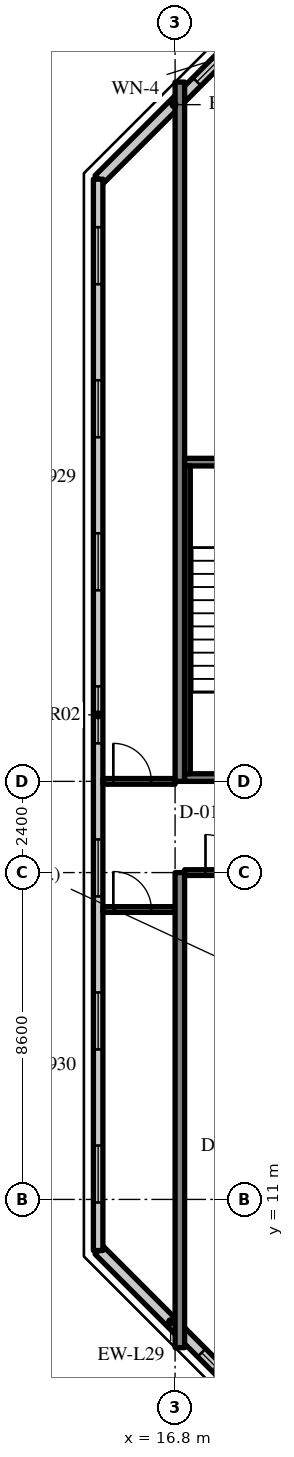
"""IFC4 building model, lengths in metres.
Left out: names, types, materials, properties, quantities, classifications, styles, units other than length and angle.
Written with IfcOpenShell. Run it as: python <this file> out.ifc"""

import sys

from ifc_helpers import new_model, si_unit, direction, frame, frame_2d, origin, place, context, subcontext, project, spatial, rectangle, extrude, source, transform, mapped, element, fill, save


model = new_model("IFC4")
c1 = context("Model", 3, precision=1e-05, world=origin(), true_north=direction((0.0, 1.0)))
c2 = subcontext(c1, "Body", "Model", "MODEL_VIEW")
j1 = project(units=[si_unit("LENGTHUNIT", "METRE"), si_unit("PLANEANGLEUNIT", "RADIAN")], contexts=[c1])
p1 = place(None, origin())
s1 = spatial("IfcSite", under=j1, at=p1, CompositionType="ELEMENT")
p2 = place(p1, origin())
s2 = spatial("IfcBuilding", under=s1, at=p2, CompositionType="ELEMENT")
p3 = place(p2, frame((0.0, 0.0, 289.7)))
s3 = spatial("IfcBuildingStorey", under=s2, at=p3, CompositionType="ELEMENT", Elevation=289.7)
m1 = source(origin(), c2, "Body", "SweptSolid", [
    extrude(rectangle(XDim=12.5, YDim=0.25, at=frame_2d((6.25, 0.0))), origin(), (0.0, 0.0, 1.0), 3.72),
])
p4 = place(p3, frame((16.925, 7.1, 0.0), z_axis=(0.0, 0.0, 1.0), x_axis=(0.0, 1.0, 0.0)))
e1 = element("IfcWall", 1, at=p4, inside=s3, PredefinedType="SHEAR", context=c2, shape_type="MappedRepresentation", body=[
    mapped(m1, transform((0.0, 0.0, 0.0), scale=1.0)),
])
m2 = source(origin(), c2, "Body", "SweptSolid", [
    extrude(rectangle(XDim=18.4, YDim=0.25, at=frame_2d((9.2, 0.0))), origin(), (0.0, 0.0, 1.0), 3.72),
])
p5 = place(p3, frame((16.925, 22.0, 0.0), z_axis=(0.0, 0.0, 1.0), x_axis=(0.0, 1.0, 0.0)))
e2 = element("IfcWall", 2, at=p5, inside=s3, PredefinedType="SHEAR", context=c2, shape_type="MappedRepresentation", body=[
    mapped(m2, transform((0.0, 0.0, 0.0), scale=1.0)),
])
m3 = source(origin(), c2, "Body", "SweptSolid", [
    extrude(rectangle(XDim=5.576, YDim=0.3, at=frame_2d((2.788, 0.0))), origin(), (0.0, 0.0, 1.0), 3.72),
])
p6 = place(p3, frame((18.743, 41.777, 0.0), z_axis=(0.0, 0.0, 1.0), x_axis=(-0.707106781187, -0.707106781187, 0.0)))
e3 = element("IfcWall", 3, at=p6, inside=s3, PredefinedType="SOLIDWALL", context=c2, shape_type="MappedRepresentation", body=[
    mapped(m3, transform((0.0, 0.0, 0.0), scale=1.0)),
])
m4 = source(origin(), c2, "Body", "SweptSolid", [
    extrude(rectangle(XDim=1.8, YDim=1.5, at=frame_2d((0.9, 0.75))), frame((0.0, 0.16, 0.0), z_axis=(0.0, -1.0, 0.0), x_axis=(1.0, 0.0, 0.0)), (0.0, 0.0, 1.0), 0.32),
])
p7 = place(p6, frame((0.135, 0.0, 0.9)))
e4 = element("IfcOpeningElement", 4, at=p7, cuts=e3, PredefinedType="OPENING", context=c2, shape_type="MappedRepresentation", body=[
    mapped(m4, transform((0.0, 0.0, 0.0), scale=1.0)),
])
m5 = source(origin(), c2, "Body", "SweptSolid", [
    extrude(rectangle(XDim=5.326, YDim=0.3, at=frame_2d((2.663, 0.0))), origin(), (0.0, 0.0, 1.0), 3.72),
])
p8 = place(p3, frame((14.8, 9.666, 0.0), z_axis=(0.0, 0.0, 1.0), x_axis=(0.707083859269, -0.707129702361, 0.0)))
e5 = element("IfcWall", 5, at=p8, inside=s3, PredefinedType="SOLIDWALL", context=c2, shape_type="MappedRepresentation", body=[
    mapped(m5, transform((0.0, 0.0, 0.0), scale=1.0)),
])
m6 = source(origin(), c2, "Body", "SweptSolid", [
    extrude(rectangle(XDim=1.2, YDim=1.5, at=frame_2d((0.6, 0.75))), frame((0.0, 0.16, 0.0), z_axis=(0.0, -1.0, 0.0), x_axis=(1.0, 0.0, 0.0)), (0.0, 0.0, 1.0), 0.32),
])
p9 = place(p8, frame((3.815, 0.0, 0.9)))
e6 = element("IfcOpeningElement", 6, at=p9, cuts=e5, PredefinedType="OPENING", context=c2, shape_type="MappedRepresentation", body=[
    mapped(m6, transform((0.0, 0.0, 0.0), scale=1.0)),
])
m7 = source(origin(), c2, "Body", "SweptSolid", [
    extrude(rectangle(XDim=28.189, YDim=0.25, at=frame_2d((14.095, 0.0))), origin(), (0.0, 0.0, 1.0), 3.72),
])
p10 = place(p3, frame((14.775, 37.845, 0.0), z_axis=(0.0, 0.0, 1.0), x_axis=(0.0, -1.0, 0.0)))
e7 = element("IfcWall", 7, at=p10, inside=s3, PredefinedType="SOLIDWALL", context=c2, shape_type="MappedRepresentation", body=[
    mapped(m7, transform((0.0, 0.0, 0.0), scale=1.0)),
])
m8 = source(origin(), c2, "Body", "SweptSolid", [
    extrude(rectangle(XDim=1.5, YDim=1.5, at=frame_2d((0.75, 0.75))), frame((0.0, 0.135, 0.0), z_axis=(0.0, -1.0, 0.0), x_axis=(1.0, 0.0, 0.0)), (0.0, 0.0, 1.0), 0.27),
])
p11 = place(p10, frame((1.263, 0.0, 0.9)))
e8 = element("IfcOpeningElement", 8, at=p11, cuts=e7, PredefinedType="OPENING", context=c2, shape_type="MappedRepresentation", body=[
    mapped(m8, transform((0.0, 0.0, 0.0), scale=1.0)),
])
p12 = place(p10, frame((5.291, 0.0, 0.9)))
e9 = element("IfcOpeningElement", 9, at=p12, cuts=e7, PredefinedType="OPENING", context=c2, shape_type="MappedRepresentation", body=[
    mapped(m8, transform((0.0, 0.0, 0.0), scale=1.0)),
])
p13 = place(p10, frame((9.318, 0.0, 0.9)))
e10 = element("IfcOpeningElement", 10, at=p13, cuts=e7, PredefinedType="OPENING", context=c2, shape_type="MappedRepresentation", body=[
    mapped(m8, transform((0.0, 0.0, 0.0), scale=1.0)),
])
p14 = place(p10, frame((13.345, 0.0, 0.9)))
e11 = element("IfcOpeningElement", 11, at=p14, cuts=e7, PredefinedType="OPENING", context=c2, shape_type="MappedRepresentation", body=[
    mapped(m8, transform((0.0, 0.0, 0.0), scale=1.0)),
])
p15 = place(p10, frame((17.372, 0.0, 0.9)))
e12 = element("IfcOpeningElement", 12, at=p15, cuts=e7, PredefinedType="OPENING", context=c2, shape_type="MappedRepresentation", body=[
    mapped(m8, transform((0.0, 0.0, 0.0), scale=1.0)),
])
p16 = place(p10, frame((21.399, 0.0, 0.9)))
e13 = element("IfcOpeningElement", 13, at=p16, cuts=e7, PredefinedType="OPENING", context=c2, shape_type="MappedRepresentation", body=[
    mapped(m8, transform((0.0, 0.0, 0.0), scale=1.0)),
])
p17 = place(p10, frame((25.426, 0.0, 0.9)))
e14 = element("IfcOpeningElement", 14, at=p17, cuts=e7, PredefinedType="OPENING", context=c2, shape_type="MappedRepresentation", body=[
    mapped(m8, transform((0.0, 0.0, 0.0), scale=1.0)),
])
m9 = source(origin(), c2, "Body", "SweptSolid", [
    extrude(rectangle(XDim=8.15, YDim=0.2, at=frame_2d((4.075, 0.0))), origin(), (0.0, 0.0, 1.0), 3.72),
])
p18 = place(p3, frame((17.05, 22.1, 0.0), z_axis=(0.0, 0.0, 1.0), x_axis=(1.0, 0.0, 0.0)))
e15 = element("IfcWall", 15, at=p18, inside=s3, PredefinedType="SOLIDWALL", context=c2, shape_type="MappedRepresentation", body=[
    mapped(m9, transform((0.0, 0.0, 0.0), scale=1.0)),
])
m10 = source(origin(), c2, "Body", "SweptSolid", [
    extrude(rectangle(XDim=1.2, YDim=2.1, at=frame_2d((0.6, 1.05))), frame((0.0, 0.11, 0.0), z_axis=(0.0, -1.0, 0.0), x_axis=(1.0, 0.0, 0.0)), (0.0, 0.0, 1.0), 0.22),
])
p19 = place(p18, frame((5.95, 0.0, 0.0)))
e16 = element("IfcOpeningElement", 16, at=p19, cuts=e15, PredefinedType="OPENING", context=c2, shape_type="MappedRepresentation", body=[
    mapped(m10, transform((0.0, 0.0, 0.0), scale=1.0)),
])
p20 = place(p3, frame((17.05, 30.4, 0.0), z_axis=(0.0, 0.0, 1.0), x_axis=(1.0, 0.0, 0.0)))
e17 = element("IfcWall", 17, at=p20, inside=s3, PredefinedType="SOLIDWALL", context=c2, shape_type="MappedRepresentation", body=[
    mapped(m9, transform((0.0, 0.0, 0.0), scale=1.0)),
])
m11 = source(origin(), c2, "Body", "SweptSolid", [
    extrude(rectangle(XDim=1.0, YDim=2.1, at=frame_2d((0.5, 1.05))), frame((0.0, 0.11, 0.0), z_axis=(0.0, -1.0, 0.0), x_axis=(1.0, 0.0, 0.0)), (0.0, 0.0, 1.0), 0.22),
])
p21 = place(p20, frame((6.05, 0.0, 0.0)))
e18 = element("IfcOpeningElement", 18, at=p21, cuts=e17, PredefinedType="OPENING", context=c2, shape_type="MappedRepresentation", body=[
    mapped(m11, transform((0.0, 0.0, 0.0), scale=1.0)),
])
m12 = source(origin(), c2, "Body", "SweptSolid", [
    extrude(rectangle(XDim=8.1, YDim=0.15, at=frame_2d((4.05, 0.0))), origin(), (0.0, 0.0, 1.0), 3.72),
])
p22 = place(p3, frame((17.125, 22.2, 0.0), z_axis=(0.0, 0.0, 1.0), x_axis=(0.0, 1.0, 0.0)))
e19 = element("IfcWall", 19, at=p22, inside=s3, PredefinedType="SOLIDWALL", context=c2, shape_type="MappedRepresentation", body=[
    mapped(m12, transform((0.0, 0.0, 0.0), scale=1.0)),
])
m13 = source(origin(), c2, "Body", "SweptSolid", [
    extrude(rectangle(XDim=8.025, YDim=0.15, at=frame_2d((4.012, 0.0))), origin(), (0.0, 0.0, 1.0), 3.02),
])
p23 = place(p3, frame((17.05, 19.6, 0.0), z_axis=(0.0, 0.0, 1.0), x_axis=(1.0, 0.0, 0.0)))
e20 = element("IfcWall", 20, at=p23, inside=s3, PredefinedType="PARTITIONING", context=c2, shape_type="MappedRepresentation", body=[
    mapped(m13, transform((0.0, 0.0, 0.0), scale=1.0)),
])
m14 = source(origin(), c2, "Body", "SweptSolid", [
    extrude(rectangle(XDim=1.0, YDim=2.1, at=frame_2d((0.5, 1.05))), frame((0.0, 0.085, 0.0), z_axis=(0.0, -1.0, 0.0), x_axis=(1.0, 0.0, 0.0)), (0.0, 0.0, 1.0), 0.17),
])
p24 = place(p23, frame((0.55, 0.0, 0.0)))
e21 = element("IfcOpeningElement", 21, at=p24, cuts=e20, PredefinedType="OPENING", context=c2, shape_type="MappedRepresentation", body=[
    mapped(m14, transform((0.0, 0.0, 0.0), scale=1.0)),
])
m15 = source(origin(), c2, "Body", "SweptSolid", [
    extrude(rectangle(XDim=1.9, YDim=0.15, at=frame_2d((0.95, 0.0))), origin(), (0.0, 0.0, 1.0), 3.02),
])
p25 = place(p3, frame((14.9, 22.0, 0.0), z_axis=(0.0, 0.0, 1.0), x_axis=(1.0, 0.0, 0.0)))
e22 = element("IfcWall", 22, at=p25, inside=s3, PredefinedType="PARTITIONING", context=c2, shape_type="MappedRepresentation", body=[
    mapped(m15, transform((0.0, 0.0, 0.0), scale=1.0)),
])
p26 = place(p25, frame((0.275, 0.0, 0.0)))
e23 = element("IfcOpeningElement", 23, at=p26, cuts=e22, PredefinedType="OPENING", context=c2, shape_type="MappedRepresentation", body=[
    mapped(m14, transform((0.0, 0.0, 0.0), scale=1.0)),
])
p27 = place(p3, frame((14.9, 18.628, 0.0), z_axis=(0.0, 0.0, 1.0), x_axis=(1.0, 0.0, 0.0)))
e24 = element("IfcWall", 24, at=p27, inside=s3, PredefinedType="PARTITIONING", context=c2, shape_type="MappedRepresentation", body=[
    mapped(m15, transform((0.0, 0.0, 0.0), scale=1.0)),
])
p28 = place(p27, frame((0.275, 0.0, 0.0)))
e25 = element("IfcOpeningElement", 25, at=p28, cuts=e24, PredefinedType="OPENING", context=c2, shape_type="MappedRepresentation", body=[
    mapped(m14, transform((0.0, 0.0, 0.0), scale=1.0)),
])
m16 = source(origin(), c2, "Body", "SweptSolid", [
    extrude(rectangle(XDim=1.8, YDim=1.5, at=frame_2d((0.9, 0.75))), frame((0.0, 0.03, 0.0), z_axis=(0.0, -1.0, 0.0), x_axis=(1.0, 0.0, 0.0)), (0.0, 0.0, 1.0), 0.06),
])
p29 = place(p7, origin())
e26 = element("IfcWindow", 26, at=p29, inside=s3, PartitioningType="SINGLE_PANEL", PredefinedType="WINDOW", context=c2, shape_type="MappedRepresentation", body=[
    mapped(m16, transform((0.0, 0.0, 0.0), scale=1.0)),
])
fill(e4, e26)
m17 = source(origin(), c2, "Body", "SweptSolid", [
    extrude(rectangle(XDim=1.2, YDim=1.5, at=frame_2d((0.6, 0.75))), frame((0.0, 0.03, 0.0), z_axis=(0.0, -1.0, 0.0), x_axis=(1.0, 0.0, 0.0)), (0.0, 0.0, 1.0), 0.06),
])
p30 = place(p9, origin())
e27 = element("IfcWindow", 27, at=p30, inside=s3, PartitioningType="SINGLE_PANEL", PredefinedType="WINDOW", context=c2, shape_type="MappedRepresentation", body=[
    mapped(m17, transform((0.0, 0.0, 0.0), scale=1.0)),
])
fill(e6, e27)
m18 = source(origin(), c2, "Body", "SweptSolid", [
    extrude(rectangle(XDim=1.5, YDim=1.5, at=frame_2d((0.75, 0.75))), frame((0.0, 0.03, 0.0), z_axis=(0.0, -1.0, 0.0), x_axis=(1.0, 0.0, 0.0)), (0.0, 0.0, 1.0), 0.06),
])
p31 = place(p11, origin())
e28 = element("IfcWindow", 28, at=p31, inside=s3, PartitioningType="SINGLE_PANEL", PredefinedType="WINDOW", context=c2, shape_type="MappedRepresentation", body=[
    mapped(m18, transform((0.0, 0.0, 0.0), scale=1.0)),
])
fill(e8, e28)
p32 = place(p12, origin())
e29 = element("IfcWindow", 29, at=p32, inside=s3, PartitioningType="SINGLE_PANEL", PredefinedType="WINDOW", context=c2, shape_type="MappedRepresentation", body=[
    mapped(m18, transform((0.0, 0.0, 0.0), scale=1.0)),
])
fill(e9, e29)
p33 = place(p13, origin())
e30 = element("IfcWindow", 30, at=p33, inside=s3, PartitioningType="SINGLE_PANEL", PredefinedType="WINDOW", context=c2, shape_type="MappedRepresentation", body=[
    mapped(m18, transform((0.0, 0.0, 0.0), scale=1.0)),
])
fill(e10, e30)
p34 = place(p14, origin())
e31 = element("IfcWindow", 31, at=p34, inside=s3, PartitioningType="SINGLE_PANEL", PredefinedType="WINDOW", context=c2, shape_type="MappedRepresentation", body=[
    mapped(m18, transform((0.0, 0.0, 0.0), scale=1.0)),
])
fill(e11, e31)
p35 = place(p15, origin())
e32 = element("IfcWindow", 32, at=p35, inside=s3, PartitioningType="SINGLE_PANEL", PredefinedType="WINDOW", context=c2, shape_type="MappedRepresentation", body=[
    mapped(m18, transform((0.0, 0.0, 0.0), scale=1.0)),
])
fill(e12, e32)
p36 = place(p16, origin())
e33 = element("IfcWindow", 33, at=p36, inside=s3, PartitioningType="SINGLE_PANEL", PredefinedType="WINDOW", context=c2, shape_type="MappedRepresentation", body=[
    mapped(m18, transform((0.0, 0.0, 0.0), scale=1.0)),
])
fill(e13, e33)
p37 = place(p17, origin())
e34 = element("IfcWindow", 34, at=p37, inside=s3, PartitioningType="SINGLE_PANEL", PredefinedType="WINDOW", context=c2, shape_type="MappedRepresentation", body=[
    mapped(m18, transform((0.0, 0.0, 0.0), scale=1.0)),
])
fill(e14, e34)
m19 = source(origin(), c2, "Body", "SweptSolid", [
    extrude(rectangle(XDim=1.0, YDim=2.1, at=frame_2d((0.5, 1.05))), frame((0.0, 0.025, 0.0), z_axis=(0.0, -1.0, 0.0), x_axis=(1.0, 0.0, 0.0)), (0.0, 0.0, 1.0), 0.05),
])
p38 = place(p24, origin())
e35 = element("IfcDoor", 35, at=p38, inside=s3, OperationType="SINGLE_SWING_LEFT", PredefinedType="DOOR", context=c2, shape_type="MappedRepresentation", body=[
    mapped(m19, transform((0.0, 0.0, 0.0), scale=1.0)),
])
fill(e21, e35)
p39 = place(p26, origin())
e36 = element("IfcDoor", 36, at=p39, inside=s3, OperationType="SINGLE_SWING_LEFT", PredefinedType="DOOR", context=c2, shape_type="MappedRepresentation", body=[
    mapped(m19, transform((0.0, 0.0, 0.0), scale=1.0)),
])
fill(e23, e36)
p40 = place(p28, origin())
e37 = element("IfcDoor", 37, at=p40, inside=s3, OperationType="SINGLE_SWING_LEFT", PredefinedType="DOOR", context=c2, shape_type="MappedRepresentation", body=[
    mapped(m19, transform((0.0, 0.0, 0.0), scale=1.0)),
])
fill(e25, e37)
save(model, sys.argv[1])
